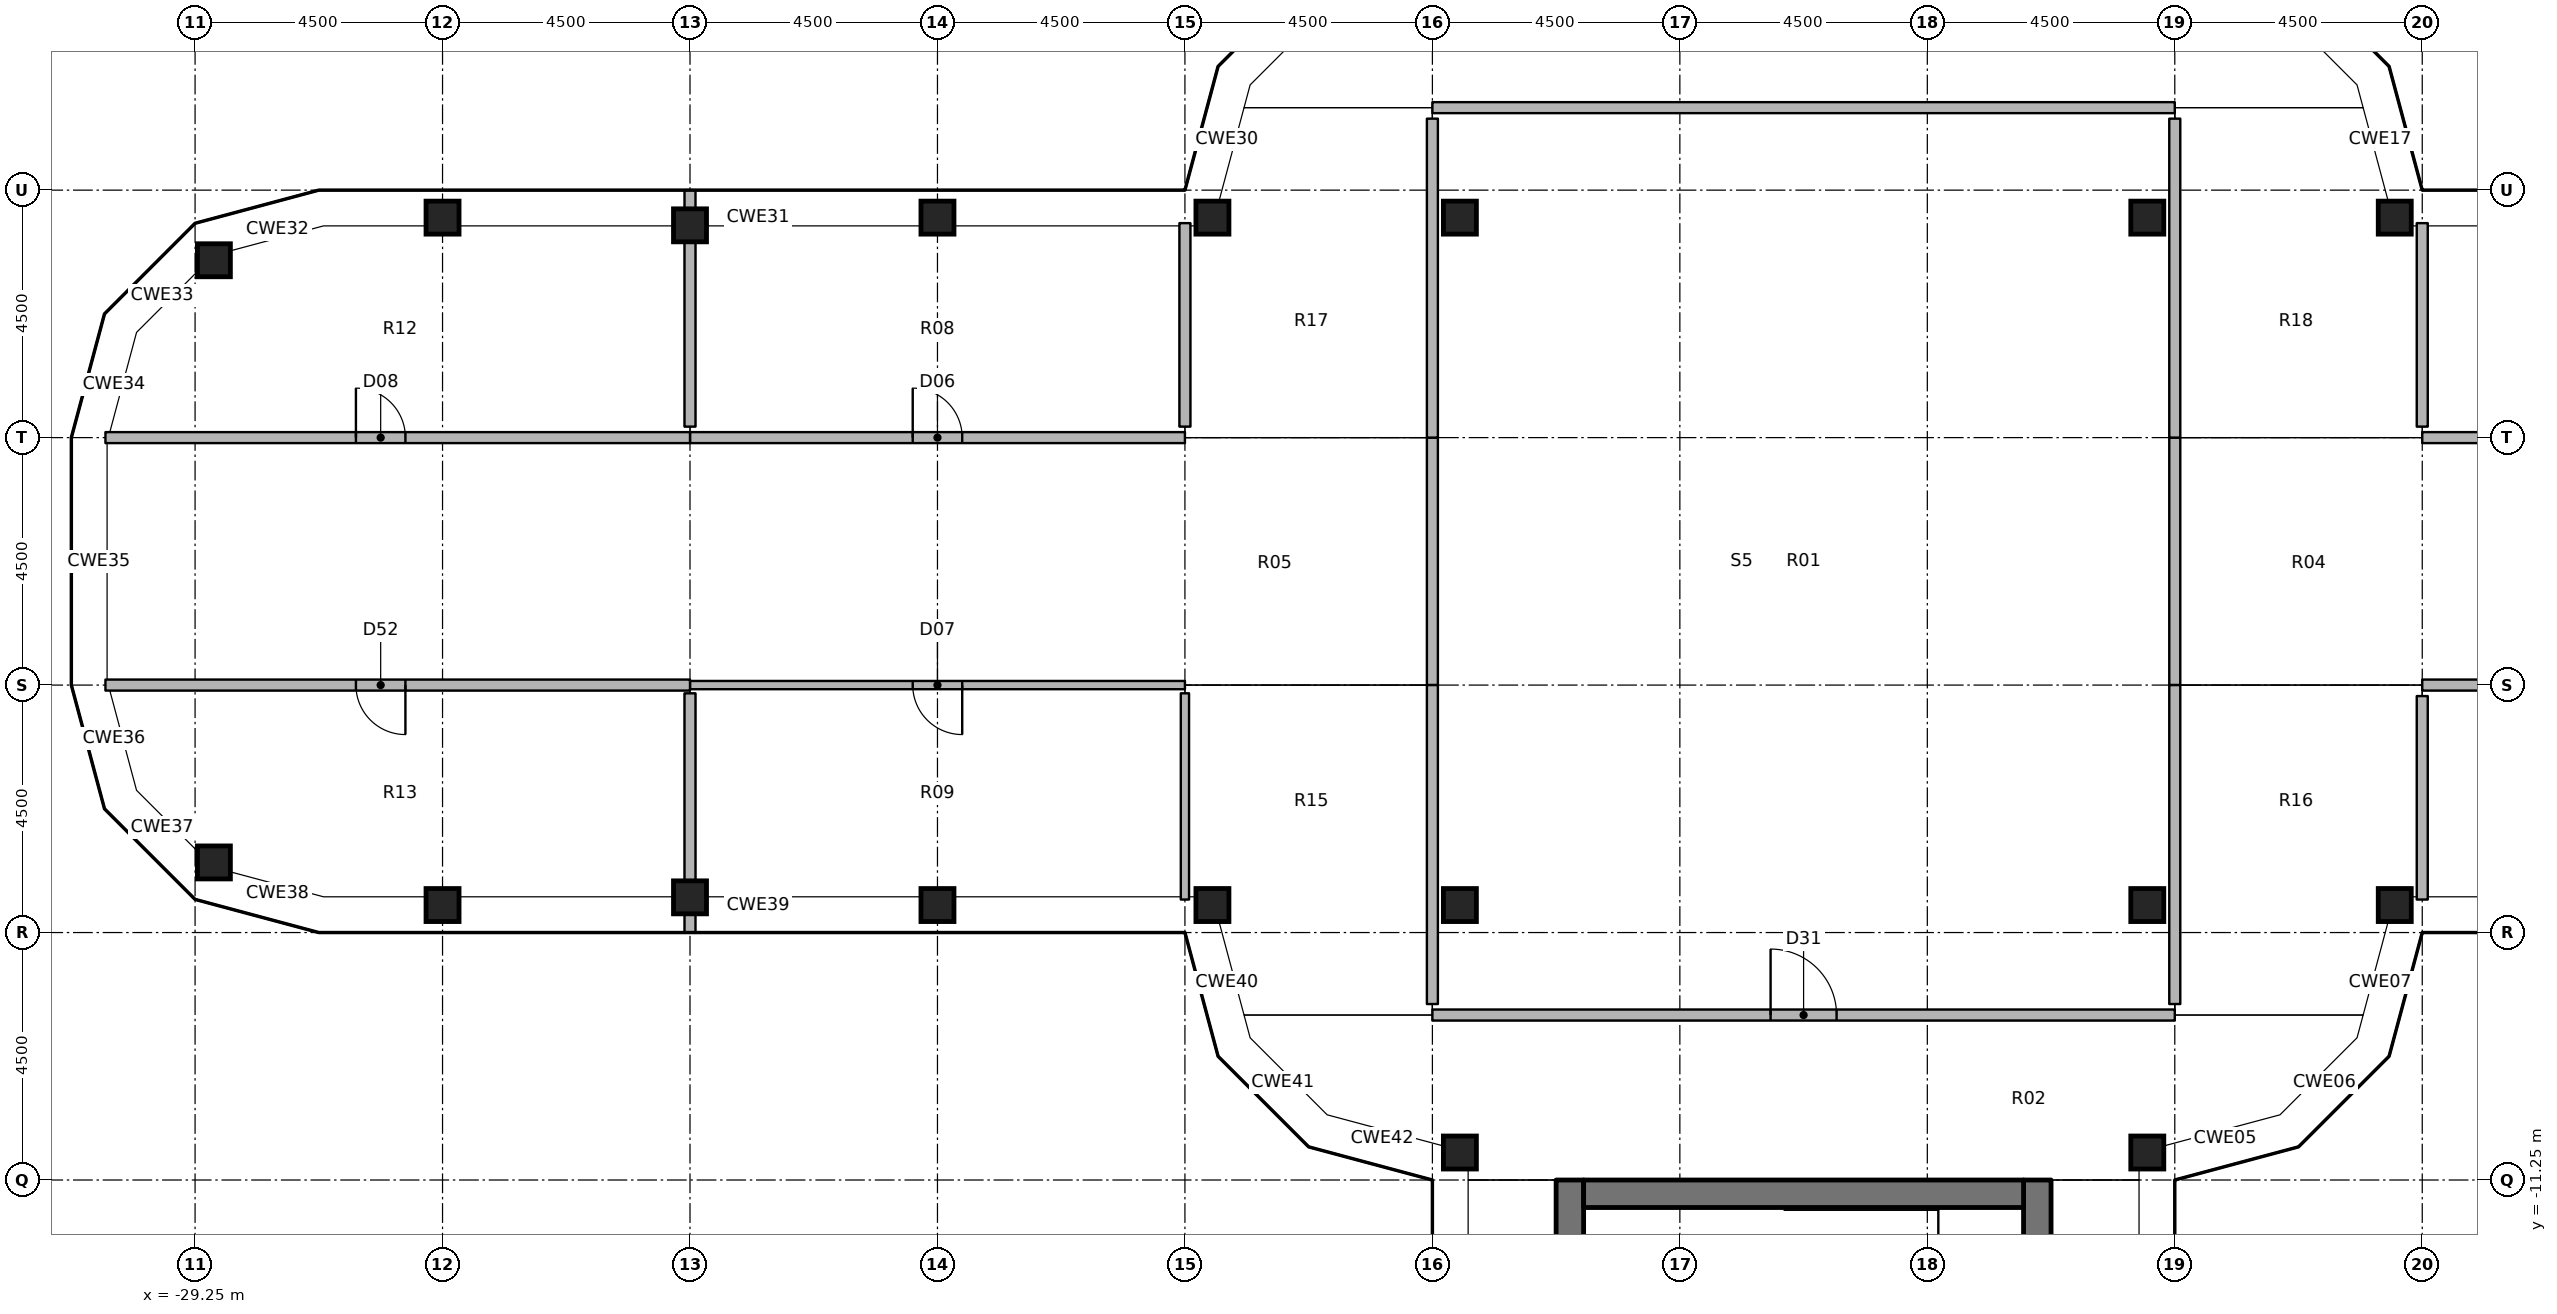
"""IFC4 building model, lengths in metres.
Left out: names, types, materials, properties, quantities, classifications, styles, units other than length and angle.
Written with IfcOpenShell. Run it as: python <this file> out.ifc"""

import sys

from ifc_helpers import new_model, si_unit, direction, frame, frame_2d, origin, origin_2d, place, context, subcontext, project, spatial, rectangle, extrude, element, fill, save


model = new_model("IFC4")
c1 = context("Model", 3, precision=1e-05, world=origin(), true_north=direction((0.0, 1.0)))
c2 = subcontext(c1, "Body", "Model", "MODEL_VIEW")
j1 = project(units=[si_unit("LENGTHUNIT", "METRE"), si_unit("PLANEANGLEUNIT", "RADIAN")], contexts=[c1])
p1 = place(None, origin())
s1 = spatial("IfcSite", under=j1, at=p1, CompositionType="ELEMENT")
p2 = place(p1, origin())
s2 = spatial("IfcBuilding", under=s1, at=p2, CompositionType="ELEMENT")
p3 = place(p2, frame((0.0, 0.0, 284.0)))
s3 = spatial("IfcBuildingStorey", under=s2, at=p3, CompositionType="ELEMENT", Elevation=284.0)
for number, where, z_axis, x_axis in (
    (1, (-28.908, -5.475, 0.0), (0.0, 0.0, 1.0), (1.0, 0.0, 0.0)),
    (2, (-28.908, 5.475, 0.0), (0.0, 0.0, 1.0), (1.0, 0.0, 0.0)),
    (3, (-24.75, -6.25, 0.0), (0.0, 0.0, 1.0), (1.0, 0.0, 0.0)),
    (4, (-24.75, 6.25, 0.0), (0.0, 0.0, 1.0), (1.0, 0.0, 0.0)),
    (5, (-20.25, -6.11, 0.0), (0.0, 0.0, 1.0), (1.0, 0.0, 0.0)),
    (6, (-20.25, 6.11, 0.0), (0.0, 0.0, 1.0), (1.0, 0.0, 0.0)),
    (7, (-15.75, -6.25, 0.0), (0.0, 0.0, 1.0), (1.0, 0.0, 0.0)),
    (8, (-15.75, 6.25, 0.0), (0.0, 0.0, 1.0), (1.0, 0.0, 0.0)),
    (9, (-10.75, -6.25, 0.0), (0.0, 0.0, 1.0), (1.0, 0.0, 0.0)),
    (10, (-10.75, 6.25, 0.0), (0.0, 0.0, 1.0), (1.0, 0.0, 0.0)),
    (11, (-6.25, -10.75, 0.0), (0.0, 0.0, 1.0), (1.0, 0.0, 0.0)),
    (12, (-6.25, -6.25, 0.0), (0.0, 0.0, 1.0), (1.0, 0.0, 0.0)),
    (13, (-6.25, 6.25, 0.0), (0.0, 0.0, 1.0), (1.0, 0.0, 0.0)),
    (14, (6.25, -10.75, 0.0), (0.0, 0.0, 1.0), (1.0, 0.0, 0.0)),
    (15, (6.25, -6.25, 0.0), (0.0, 0.0, 1.0), (1.0, 0.0, 0.0)),
    (16, (6.25, 6.25, 0.0), (0.0, 0.0, 1.0), (1.0, 0.0, 0.0)),
    (17, (10.75, -6.25, 0.0), (0.0, 0.0, 1.0), (1.0, 0.0, 0.0)),
    (18, (10.75, 6.25, 0.0), (0.0, 0.0, 1.0), (1.0, 0.0, 0.0)),
):
    element("IfcColumn", number, at=place(p3, frame(where, z_axis=z_axis, x_axis=x_axis)), inside=s3, PredefinedType="COLUMN", context=c2, shape_type="SweptSolid", body=[
        extrude(rectangle(XDim=0.6, YDim=0.6, at=origin_2d()), origin(), (0.0, 0.0, 1.0), 7.45),
    ])
p4 = place(p3, frame((-4.25, -11.25, 0.0), z_axis=(0.0, 0.0, 1.0), x_axis=(0.0, -1.0, 0.0)))
e19 = element("IfcWall", 19, at=p4, inside=s3, PredefinedType="SHEAR", context=c2, shape_type="SweptSolid", body=[
    extrude(rectangle(XDim=15.0, YDim=0.5, at=frame_2d((7.5, 0.0))), origin(), (0.0, 0.0, 1.0), 7.6),
])
p5 = place(p4, frame((7.15, 0.0, 0.0)))
e20 = element("IfcOpeningElement", 20, at=p5, cuts=e19, PredefinedType="OPENING", context=c2, shape_type="SweptSolid", body=[
    extrude(rectangle(XDim=1.5, YDim=2.3, at=frame_2d((0.75, 1.15))), frame((0.0, 0.26, 0.0), z_axis=(0.0, -1.0, 0.0), x_axis=(1.0, 0.0, 0.0)), (0.0, 0.0, 1.0), 0.52),
])
p6 = place(p4, frame((5.55, 0.0, 0.0)))
e21 = element("IfcOpeningElement", 21, at=p6, cuts=e19, PredefinedType="OPENING", context=c2, shape_type="SweptSolid", body=[
    extrude(rectangle(XDim=1.2, YDim=2.1, at=frame_2d((0.6, 1.05))), frame((0.0, 0.26, 0.0), z_axis=(0.0, -1.0, 0.0), x_axis=(1.0, 0.0, 0.0)), (0.0, 0.0, 1.0), 0.52),
])
p7 = place(p3, frame((4.25, -11.25, 0.0), z_axis=(0.0, 0.0, 1.0), x_axis=(0.0, -1.0, 0.0)))
e22 = element("IfcWall", 22, at=p7, inside=s3, PredefinedType="SHEAR", context=c2, shape_type="SweptSolid", body=[
    extrude(rectangle(XDim=15.0, YDim=0.5, at=frame_2d((7.5, 0.0))), origin(), (0.0, 0.0, 1.0), 7.6),
])
p8 = place(p7, frame((7.15, 0.0, 0.0)))
e23 = element("IfcOpeningElement", 23, at=p8, cuts=e22, PredefinedType="OPENING", context=c2, shape_type="SweptSolid", body=[
    extrude(rectangle(XDim=1.5, YDim=2.3, at=frame_2d((0.75, 1.15))), frame((0.0, 0.26, 0.0), z_axis=(0.0, -1.0, 0.0), x_axis=(1.0, 0.0, 0.0)), (0.0, 0.0, 1.0), 0.52),
])
p9 = place(p7, frame((13.9, 0.0, 0.0)))
e24 = element("IfcOpeningElement", 24, at=p9, cuts=e22, PredefinedType="OPENING", context=c2, shape_type="SweptSolid", body=[
    extrude(rectangle(XDim=0.9, YDim=2.1, at=frame_2d((0.45, 1.05))), frame((0.0, 0.26, 0.0), z_axis=(0.0, -1.0, 0.0), x_axis=(1.0, 0.0, 0.0)), (0.0, 0.0, 1.0), 0.52),
])
p10 = place(p7, frame((1.15, 0.0, 0.0)))
e25 = element("IfcOpeningElement", 25, at=p10, cuts=e22, PredefinedType="OPENING", context=c2, shape_type="SweptSolid", body=[
    extrude(rectangle(XDim=1.2, YDim=2.1, at=frame_2d((0.6, 1.05))), frame((0.0, 0.26, 0.0), z_axis=(0.0, -1.0, 0.0), x_axis=(1.0, 0.0, 0.0)), (0.0, 0.0, 1.0), 0.52),
])
p11 = place(p3, frame((-4.0, -11.5, 0.0), z_axis=(0.0, 0.0, 1.0), x_axis=(1.0, 0.0, 0.0)))
e26 = element("IfcWall", 26, at=p11, inside=s3, PredefinedType="SHEAR", context=c2, shape_type="SweptSolid", body=[
    extrude(rectangle(XDim=8.0, YDim=0.5, at=frame_2d((4.0, 0.0))), origin(), (0.0, 0.0, 1.0), 7.6),
])
p12 = place(p3, frame((-6.75, -8.25, 0.0), z_axis=(0.0, 0.0, 1.0), x_axis=(1.0, 0.0, 0.0)))
e27 = element("IfcWall", 27, at=p12, inside=s3, PredefinedType="PARTITIONING", context=c2, shape_type="SweptSolid", body=[
    extrude(rectangle(XDim=13.5, YDim=0.2, at=frame_2d((6.75, 0.0))), origin(), (0.0, 0.0, 1.0), 7.45),
])
p13 = place(p12, frame((6.15, 0.0, 0.0)))
e28 = element("IfcOpeningElement", 28, at=p13, cuts=e27, PredefinedType="OPENING", context=c2, shape_type="SweptSolid", body=[
    extrude(rectangle(XDim=1.2, YDim=2.1, at=frame_2d((0.6, 1.05))), frame((0.0, 0.11, 0.0), z_axis=(0.0, -1.0, 0.0), x_axis=(1.0, 0.0, 0.0)), (0.0, 0.0, 1.0), 0.22),
])
p14 = place(p3, frame((-6.75, 8.25, 0.0), z_axis=(0.0, 0.0, 1.0), x_axis=(1.0, 0.0, 0.0)))
e29 = element("IfcWall", 29, at=p14, inside=s3, PredefinedType="PARTITIONING", context=c2, shape_type="SweptSolid", body=[
    extrude(rectangle(XDim=13.5, YDim=0.2, at=frame_2d((6.75, 0.0))), origin(), (0.0, 0.0, 1.0), 7.45),
])
for number, where, z_axis, x_axis in (
    (30, (6.75, 2.25, 0.0), (0.0, 0.0, 1.0), (0.0, -1.0, 0.0)),
    (31, (-6.75, -2.25, 0.0), (0.0, 0.0, 1.0), (0.0, 1.0, 0.0)),
):
    element("IfcWall", number, at=place(p3, frame(where, z_axis=z_axis, x_axis=x_axis)), inside=s3, PredefinedType="PARTITIONING", context=c2, shape_type="SweptSolid", body=[
        extrude(rectangle(XDim=4.5, YDim=0.2, at=frame_2d((2.25, 0.0))), origin(), (0.0, 0.0, 1.0), 7.45),
    ])
for number, where, z_axis, x_axis in (
    (32, (-6.75, -8.05, 0.0), (0.0, 0.0, 1.0), (0.0, 1.0, 0.0)),
    (33, (6.75, -2.25, 0.0), (0.0, 0.0, 1.0), (0.0, -1.0, 0.0)),
    (34, (-6.75, 2.25, 0.0), (0.0, 0.0, 1.0), (0.0, 1.0, 0.0)),
    (35, (6.75, 8.05, 0.0), (0.0, 0.0, 1.0), (0.0, -1.0, 0.0)),
):
    element("IfcWall", number, at=place(p3, frame(where, z_axis=z_axis, x_axis=x_axis)), inside=s3, PredefinedType="PARTITIONING", context=c2, shape_type="SweptSolid", body=[
        extrude(rectangle(XDim=5.8, YDim=0.2, at=frame_2d((2.9, 0.0))), origin(), (0.0, 0.0, 1.0), 6.681),
    ])
p15 = place(p3, frame((11.25, 2.25, 0.0), z_axis=(0.0, 0.0, 1.0), x_axis=(1.0, 0.0, 0.0)))
e36 = element("IfcWall", 36, at=p15, inside=s3, PredefinedType="PARTITIONING", context=c2, shape_type="SweptSolid", body=[
    extrude(rectangle(XDim=9.0, YDim=0.2, at=frame_2d((4.5, 0.0))), origin(), (0.0, 0.0, 1.0), 6.828),
])
p16 = place(p15, frame((4.05, 0.0, 0.0)))
e37 = element("IfcOpeningElement", 37, at=p16, cuts=e36, PredefinedType="OPENING", context=c2, shape_type="SweptSolid", body=[
    extrude(rectangle(XDim=0.9, YDim=2.1, at=frame_2d((0.45, 1.05))), frame((0.0, 0.11, 0.0), z_axis=(0.0, -1.0, 0.0), x_axis=(1.0, 0.0, 0.0)), (0.0, 0.0, 1.0), 0.22),
])
p17 = place(p3, frame((20.25, -2.25, 0.0), z_axis=(0.0, 0.0, 1.0), x_axis=(-1.0, 0.0, 0.0)))
e38 = element("IfcWall", 38, at=p17, inside=s3, PredefinedType="PARTITIONING", context=c2, shape_type="SweptSolid", body=[
    extrude(rectangle(XDim=9.0, YDim=0.2, at=frame_2d((4.5, 0.0))), origin(), (0.0, 0.0, 1.0), 6.828),
])
p18 = place(p17, frame((4.05, 0.0, 0.0)))
e39 = element("IfcOpeningElement", 39, at=p18, cuts=e38, PredefinedType="OPENING", context=c2, shape_type="SweptSolid", body=[
    extrude(rectangle(XDim=0.9, YDim=2.1, at=frame_2d((0.45, 1.05))), frame((0.0, 0.11, 0.0), z_axis=(0.0, -1.0, 0.0), x_axis=(1.0, 0.0, 0.0)), (0.0, 0.0, 1.0), 0.22),
])
p19 = place(p3, frame((-20.25, 2.25, 0.0), z_axis=(0.0, 0.0, 1.0), x_axis=(1.0, 0.0, 0.0)))
e40 = element("IfcWall", 40, at=p19, inside=s3, PredefinedType="PARTITIONING", context=c2, shape_type="SweptSolid", body=[
    extrude(rectangle(XDim=9.0, YDim=0.2, at=frame_2d((4.5, 0.0))), origin(), (0.0, 0.0, 1.0), 6.828),
])
p20 = place(p19, frame((4.05, 0.0, 0.0)))
e41 = element("IfcOpeningElement", 41, at=p20, cuts=e40, PredefinedType="OPENING", context=c2, shape_type="SweptSolid", body=[
    extrude(rectangle(XDim=0.9, YDim=2.1, at=frame_2d((0.45, 1.05))), frame((0.0, 0.11, 0.0), z_axis=(0.0, -1.0, 0.0), x_axis=(1.0, 0.0, 0.0)), (0.0, 0.0, 1.0), 0.22),
])
p21 = place(p3, frame((-11.25, -2.25, 0.0), z_axis=(0.0, 0.0, 1.0), x_axis=(-1.0, 0.0, 0.0)))
e42 = element("IfcWall", 42, at=p21, inside=s3, PredefinedType="PARTITIONING", context=c2, shape_type="SweptSolid", body=[
    extrude(rectangle(XDim=9.0, YDim=0.15, at=frame_2d((4.5, 0.0))), origin(), (0.0, 0.0, 1.0), 6.828),
])
p22 = place(p21, frame((4.05, 0.0, 0.0)))
e43 = element("IfcOpeningElement", 43, at=p22, cuts=e42, PredefinedType="OPENING", context=c2, shape_type="SweptSolid", body=[
    extrude(rectangle(XDim=0.9, YDim=2.1, at=frame_2d((0.45, 1.05))), frame((0.0, 0.085, 0.0), z_axis=(0.0, -1.0, 0.0), x_axis=(1.0, 0.0, 0.0)), (0.0, 0.0, 1.0), 0.17),
])
p23 = place(p3, frame((-30.88, 2.25, 0.0), z_axis=(0.0, 0.0, 1.0), x_axis=(1.0, 0.0, 0.0)))
e44 = element("IfcWall", 44, at=p23, inside=s3, PredefinedType="PARTITIONING", context=c2, shape_type="SweptSolid", body=[
    extrude(rectangle(XDim=10.63, YDim=0.2, at=frame_2d((5.315, 0.0))), origin(), (0.0, 0.0, 1.0), 6.53),
])
p24 = place(p23, frame((4.555, 0.0, 0.0)))
e45 = element("IfcOpeningElement", 45, at=p24, cuts=e44, PredefinedType="OPENING", context=c2, shape_type="SweptSolid", body=[
    extrude(rectangle(XDim=0.9, YDim=2.1, at=frame_2d((0.45, 1.05))), frame((0.0, 0.11, 0.0), z_axis=(0.0, -1.0, 0.0), x_axis=(1.0, 0.0, 0.0)), (0.0, 0.0, 1.0), 0.22),
])
p25 = place(p3, frame((-20.25, -2.25, 0.0), z_axis=(0.0, 0.0, 1.0), x_axis=(-1.0, 0.0, 0.0)))
e46 = element("IfcWall", 46, at=p25, inside=s3, PredefinedType="PARTITIONING", context=c2, shape_type="SweptSolid", body=[
    extrude(rectangle(XDim=10.63, YDim=0.2, at=frame_2d((5.315, 0.0))), origin(), (0.0, 0.0, 1.0), 6.53),
])
p26 = place(p25, frame((5.175, 0.0, 0.0)))
e47 = element("IfcOpeningElement", 47, at=p26, cuts=e46, PredefinedType="OPENING", context=c2, shape_type="SweptSolid", body=[
    extrude(rectangle(XDim=0.9, YDim=2.1, at=frame_2d((0.45, 1.05))), frame((0.0, 0.11, 0.0), z_axis=(0.0, -1.0, 0.0), x_axis=(1.0, 0.0, 0.0)), (0.0, 0.0, 1.0), 0.22),
])
for number, where, z_axis, x_axis in (
    (48, (11.25, 2.45, 0.0), (0.0, 0.0, 1.0), (0.0, 1.0, 0.0)),
    (49, (11.25, -6.15, 0.0), (0.0, 0.0, 1.0), (0.0, 1.0, 0.0)),
):
    element("IfcWall", number, at=place(p3, frame(where, z_axis=z_axis, x_axis=x_axis)), inside=s3, PredefinedType="PARTITIONING", context=c2, shape_type="SweptSolid", body=[
        extrude(rectangle(XDim=3.7, YDim=0.2, at=frame_2d((1.85, 0.0))), origin(), (0.0, 0.0, 1.0), 7.45),
    ])
p27 = place(p3, frame((-20.25, 2.45, 0.0), z_axis=(0.0, 0.0, 1.0), x_axis=(0.0, 1.0, 0.0)))
e50 = element("IfcWall", 50, at=p27, inside=s3, PredefinedType="PARTITIONING", context=c2, shape_type="SweptSolid", body=[
    extrude(rectangle(XDim=3.36, YDim=0.2, at=frame_2d((1.68, 0.0))), origin(), (0.0, 0.0, 1.0), 7.45),
])
p28 = place(p3, frame((-20.25, 6.41, 0.0), z_axis=(0.0, 0.0, 1.0), x_axis=(0.0, 1.0, 0.0)))
e51 = element("IfcWall", 51, at=p28, inside=s3, PredefinedType="PARTITIONING", context=c2, shape_type="SweptSolid", body=[
    extrude(rectangle(XDim=0.34, YDim=0.2, at=frame_2d((0.17, 0.0))), origin(), (0.0, 0.0, 1.0), 7.45),
])
p29 = place(p3, frame((-11.25, 6.15, 0.0), z_axis=(0.0, 0.0, 1.0), x_axis=(0.0, -1.0, 0.0)))
e52 = element("IfcWall", 52, at=p29, inside=s3, PredefinedType="PARTITIONING", context=c2, shape_type="SweptSolid", body=[
    extrude(rectangle(XDim=3.7, YDim=0.2, at=frame_2d((1.85, 0.0))), origin(), (0.0, 0.0, 1.0), 7.45),
])
p30 = place(p3, frame((-20.25, -6.75, 0.0), z_axis=(0.0, 0.0, 1.0), x_axis=(0.0, 1.0, 0.0)))
e53 = element("IfcWall", 53, at=p30, inside=s3, PredefinedType="PARTITIONING", context=c2, shape_type="SweptSolid", body=[
    extrude(rectangle(XDim=0.34, YDim=0.2, at=frame_2d((0.17, 0.0))), origin(), (0.0, 0.0, 1.0), 7.45),
])
p31 = place(p3, frame((-20.25, -5.81, 0.0), z_axis=(0.0, 0.0, 1.0), x_axis=(0.0, 1.0, 0.0)))
e54 = element("IfcWall", 54, at=p31, inside=s3, PredefinedType="PARTITIONING", context=c2, shape_type="SweptSolid", body=[
    extrude(rectangle(XDim=3.41, YDim=0.2, at=frame_2d((1.705, 0.0))), origin(), (0.0, 0.0, 1.0), 7.45),
])
p32 = place(p3, frame((-11.25, -2.4, 0.0), z_axis=(0.0, 0.0, 1.0), x_axis=(0.0, -1.0, 0.0)))
e55 = element("IfcWall", 55, at=p32, inside=s3, PredefinedType="PARTITIONING", context=c2, shape_type="SweptSolid", body=[
    extrude(rectangle(XDim=3.75, YDim=0.15, at=frame_2d((1.875, 0.0))), origin(), (0.0, 0.0, 1.0), 7.45),
])
p33 = place(p13, origin())
e56 = element("IfcDoor", 56, at=p33, inside=s3, OperationType="SINGLE_SWING_LEFT", PredefinedType="DOOR", context=c2, shape_type="SweptSolid", body=[
    extrude(rectangle(XDim=1.2, YDim=2.1, at=frame_2d((0.6, 1.05))), frame((0.0, 0.025, 0.0), z_axis=(0.0, -1.0, 0.0), x_axis=(1.0, 0.0, 0.0)), (0.0, 0.0, 1.0), 0.05),
])
fill(e28, e56)
p34 = place(p20, origin())
e57 = element("IfcDoor", 57, at=p34, inside=s3, OperationType="SINGLE_SWING_LEFT", PredefinedType="DOOR", context=c2, shape_type="SweptSolid", body=[
    extrude(rectangle(XDim=0.9, YDim=2.1, at=frame_2d((0.45, 1.05))), frame((0.0, 0.025, 0.0), z_axis=(0.0, -1.0, 0.0), x_axis=(1.0, 0.0, 0.0)), (0.0, 0.0, 1.0), 0.05),
])
fill(e41, e57)
p35 = place(p22, origin())
e58 = element("IfcDoor", 58, at=p35, inside=s3, OperationType="SINGLE_SWING_LEFT", PredefinedType="DOOR", context=c2, shape_type="SweptSolid", body=[
    extrude(rectangle(XDim=0.9, YDim=2.1, at=frame_2d((0.45, 1.05))), frame((0.0, 0.025, 0.0), z_axis=(0.0, -1.0, 0.0), x_axis=(1.0, 0.0, 0.0)), (0.0, 0.0, 1.0), 0.05),
])
fill(e43, e58)
p36 = place(p24, origin())
e59 = element("IfcDoor", 59, at=p36, inside=s3, OperationType="SINGLE_SWING_LEFT", PredefinedType="DOOR", context=c2, shape_type="SweptSolid", body=[
    extrude(rectangle(XDim=0.9, YDim=2.1, at=frame_2d((0.45, 1.05))), frame((0.0, 0.025, 0.0), z_axis=(0.0, -1.0, 0.0), x_axis=(1.0, 0.0, 0.0)), (0.0, 0.0, 1.0), 0.05),
])
fill(e45, e59)
p37 = place(p26, origin())
e60 = element("IfcDoor", 60, at=p37, inside=s3, OperationType="SINGLE_SWING_LEFT", PredefinedType="DOOR", context=c2, shape_type="SweptSolid", body=[
    extrude(rectangle(XDim=0.9, YDim=2.1, at=frame_2d((0.45, 1.05))), frame((0.0, 0.025, 0.0), z_axis=(0.0, -1.0, 0.0), x_axis=(1.0, 0.0, 0.0)), (0.0, 0.0, 1.0), 0.05),
])
fill(e47, e60)
save(model, sys.argv[1])
